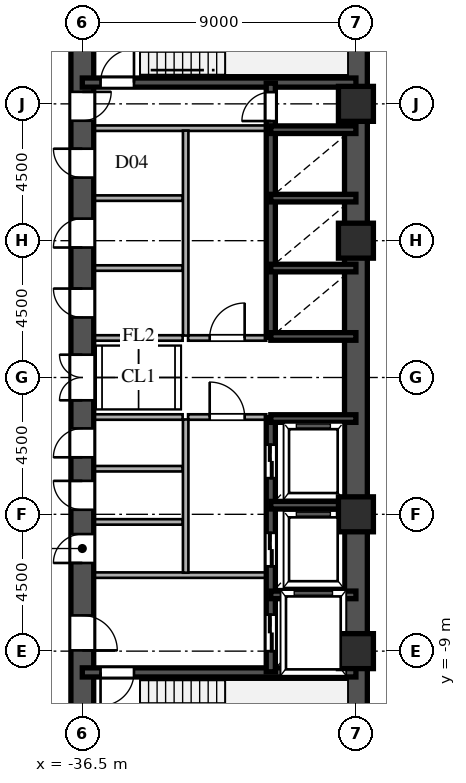
"""IFC4 building model, lengths in metres.
Left out: names, types, materials, properties, quantities, classifications, styles, units other than length and angle.
Written with IfcOpenShell. Run it as: python <this file> out.ifc"""

import sys

from ifc_helpers import new_model, si_unit, direction, frame, frame_2d, origin, origin_2d, place, context, subcontext, project, spatial, rectangle, hollow_rectangle, extrude, source, transform, mapped, element, fill, save


model = new_model("IFC4")
c1 = context("Model", 3, precision=1e-05, world=origin(), true_north=direction((0.0, 1.0)))
c2 = subcontext(c1, "Body", "Model", "MODEL_VIEW")
j1 = project(units=[si_unit("LENGTHUNIT", "METRE"), si_unit("PLANEANGLEUNIT", "RADIAN")], contexts=[c1])
p1 = place(None, origin())
s1 = spatial("IfcSite", under=j1, at=p1, CompositionType="ELEMENT")
p2 = place(p1, origin())
s2 = spatial("IfcBuilding", under=s1, at=p2, CompositionType="ELEMENT")
p3 = place(p2, frame((0.0, 0.0, 54.9)))
s3 = spatial("IfcBuildingStorey", under=s2, at=p3, CompositionType="ELEMENT", Elevation=54.9)
m1 = source(origin(), c2, "Body", "SweptSolid", [
    extrude(hollow_rectangle(XDim=1.15, YDim=1.15, WallThickness=0.048, at=origin_2d()), origin(), (0.0, 0.0, 1.0), 3.6),
])
for number, where, z_axis, x_axis in (
    (1, (-27.5, -9.0, 0.0), (0.0, 0.0, 1.0), (1.0, 0.0, 0.0)),
    (2, (-27.5, -4.5, 0.0), (0.0, 0.0, 1.0), (1.0, 0.0, 0.0)),
    (3, (-27.5, 4.5, 0.0), (0.0, 0.0, 1.0), (1.0, 0.0, 0.0)),
    (4, (-27.5, 9.0, 0.0), (0.0, 0.0, 1.0), (1.0, 0.0, 0.0)),
):
    element("IfcColumn", number, at=place(p3, frame(where, z_axis=z_axis, x_axis=x_axis)), inside=s3, PredefinedType="COLUMN", context=c2, shape_type="MappedRepresentation", body=[
        mapped(m1, transform((0.0, 0.0, 0.0), scale=1.0)),
    ])
for number, where, z_axis, x_axis in (
    (5, (-27.5, -13.5, 0.0), (0.0, 0.0, 1.0), (0.0, 1.0, 0.0)),
    (6, (-27.5, 1.3, 0.0), (0.0, 0.0, 1.0), (0.0, 1.0, 0.0)),
):
    element("IfcWall", number, at=place(p3, frame(where, z_axis=z_axis, x_axis=x_axis)), inside=s3, PredefinedType="SHEAR", context=c2, shape_type="SweptSolid", body=[
        extrude(rectangle(XDim=12.2, YDim=0.75, at=frame_2d((6.1, 0.0))), origin(), (0.0, 0.0, 1.0), 3.38),
    ])
p4 = place(p3, frame((-27.5, -1.3, 0.0), z_axis=(0.0, 0.0, 1.0), x_axis=(0.0, 1.0, 0.0)))
e7 = element("IfcWall", 7, at=p4, inside=s3, PredefinedType="SHEAR", context=c2, shape_type="SweptSolid", body=[
    extrude(rectangle(XDim=2.6, YDim=0.75, at=frame_2d((1.3, 0.0))), origin(), (0.0, 0.0, 1.0), 3.38),
])
p5 = place(p3, frame((-36.5, -13.65, 0.0), z_axis=(0.0, 0.0, 1.0), x_axis=(0.0, 1.0, 0.0)))
e8 = element("IfcWall", 8, at=p5, inside=s3, PredefinedType="SHEAR", context=c2, shape_type="SweptSolid", body=[
    extrude(rectangle(XDim=7.15, YDim=0.75, at=frame_2d((3.575, 0.0))), origin(), (0.0, 0.0, 1.0), 3.38),
])
p6 = place(p5, frame((4.675, 0.0, 0.0)))
e9 = element("IfcOpeningElement", 9, at=p6, cuts=e8, PredefinedType="OPENING", context=c2, shape_type="SweptSolid", body=[
    extrude(rectangle(XDim=1.15, YDim=2.2, at=frame_2d((0.575, 1.1))), frame((0.0, 0.385, 0.0), z_axis=(0.0, -1.0, 0.0), x_axis=(1.0, 0.0, 0.0)), (0.0, 0.0, 1.0), 0.77),
])
p7 = place(p3, frame((-36.5, -1.3, 0.0), z_axis=(0.0, 0.0, 1.0), x_axis=(0.0, 1.0, 0.0)))
e10 = element("IfcWall", 10, at=p7, inside=s3, PredefinedType="SHEAR", context=c2, shape_type="SweptSolid", body=[
    extrude(rectangle(XDim=2.6, YDim=0.75, at=frame_2d((1.3, 0.0))), origin(), (0.0, 0.0, 1.0), 3.38),
])
p8 = place(p7, frame((0.55, 0.0, 0.0)))
e11 = element("IfcOpeningElement", 11, at=p8, cuts=e10, PredefinedType="OPENING", context=c2, shape_type="SweptSolid", body=[
    extrude(rectangle(XDim=1.5, YDim=2.3, at=frame_2d((0.75, 1.15))), frame((0.0, 0.385, 0.0), z_axis=(0.0, -1.0, 0.0), x_axis=(1.0, 0.0, 0.0)), (0.0, 0.0, 1.0), 0.77),
])
p9 = place(p3, frame((-36.5, 8.2, 0.0), z_axis=(0.0, 0.0, 1.0), x_axis=(0.0, 1.0, 0.0)))
e12 = element("IfcWall", 12, at=p9, inside=s3, PredefinedType="SHEAR", context=c2, shape_type="SweptSolid", body=[
    extrude(rectangle(XDim=5.45, YDim=0.75, at=frame_2d((2.725, 0.0))), origin(), (0.0, 0.0, 1.0), 3.38),
])
p10 = place(p9, frame((0.245, 0.0, 0.0)))
e13 = element("IfcOpeningElement", 13, at=p10, cuts=e12, PredefinedType="OPENING", context=c2, shape_type="SweptSolid", body=[
    extrude(rectangle(XDim=0.95, YDim=2.15, at=frame_2d((0.475, 1.075))), frame((0.0, 0.385, 0.0), z_axis=(0.0, -1.0, 0.0), x_axis=(1.0, 0.0, 0.0)), (0.0, 0.0, 1.0), 0.77),
])
p11 = place(p3, frame((-36.5, -6.5, 0.0), z_axis=(0.0, 0.0, 1.0), x_axis=(0.0, 1.0, 0.0)))
e14 = element("IfcWall", 14, at=p11, inside=s3, PredefinedType="SHEAR", context=c2, shape_type="SweptSolid", body=[
    extrude(rectangle(XDim=1.75, YDim=0.75, at=frame_2d((0.875, 0.0))), origin(), (0.0, 0.0, 1.0), 3.38),
])
p12 = place(p11, frame((0.4, 0.0, 0.0)))
e15 = element("IfcOpeningElement", 15, at=p12, cuts=e14, PredefinedType="OPENING", context=c2, shape_type="SweptSolid", body=[
    extrude(rectangle(XDim=0.95, YDim=2.15, at=frame_2d((0.475, 1.075))), frame((0.0, 0.385, 0.0), z_axis=(0.0, -1.0, 0.0), x_axis=(1.0, 0.0, 0.0)), (0.0, 0.0, 1.0), 0.77),
])
p13 = place(p3, frame((-36.5, -4.75, 0.0), z_axis=(0.0, 0.0, 1.0), x_axis=(0.0, 1.0, 0.0)))
e16 = element("IfcWall", 16, at=p13, inside=s3, PredefinedType="SHEAR", context=c2, shape_type="SweptSolid", body=[
    extrude(rectangle(XDim=1.75, YDim=0.75, at=frame_2d((0.875, 0.0))), origin(), (0.0, 0.0, 1.0), 3.38),
])
p14 = place(p13, frame((0.4, 0.0, 0.0)))
e17 = element("IfcOpeningElement", 17, at=p14, cuts=e16, PredefinedType="OPENING", context=c2, shape_type="SweptSolid", body=[
    extrude(rectangle(XDim=0.95, YDim=2.15, at=frame_2d((0.475, 1.075))), frame((0.0, 0.385, 0.0), z_axis=(0.0, -1.0, 0.0), x_axis=(1.0, 0.0, 0.0)), (0.0, 0.0, 1.0), 0.77),
])
p15 = place(p3, frame((-36.5, -3.0, 0.0), z_axis=(0.0, 0.0, 1.0), x_axis=(0.0, 1.0, 0.0)))
e18 = element("IfcWall", 18, at=p15, inside=s3, PredefinedType="SHEAR", context=c2, shape_type="SweptSolid", body=[
    extrude(rectangle(XDim=1.7, YDim=0.75, at=frame_2d((0.85, 0.0))), origin(), (0.0, 0.0, 1.0), 3.38),
])
p16 = place(p15, frame((0.375, 0.0, 0.0)))
e19 = element("IfcOpeningElement", 19, at=p16, cuts=e18, PredefinedType="OPENING", context=c2, shape_type="SweptSolid", body=[
    extrude(rectangle(XDim=0.95, YDim=2.15, at=frame_2d((0.475, 1.075))), frame((0.0, 0.385, 0.0), z_axis=(0.0, -1.0, 0.0), x_axis=(1.0, 0.0, 0.0)), (0.0, 0.0, 1.0), 0.77),
])
p17 = place(p3, frame((-36.5, 1.3, 0.0), z_axis=(0.0, 0.0, 1.0), x_axis=(0.0, 1.0, 0.0)))
e20 = element("IfcWall", 20, at=p17, inside=s3, PredefinedType="SHEAR", context=c2, shape_type="SweptSolid", body=[
    extrude(rectangle(XDim=2.3, YDim=0.75, at=frame_2d((1.15, 0.0))), origin(), (0.0, 0.0, 1.0), 3.38),
])
p18 = place(p17, frame((0.675, 0.0, 0.0)))
e21 = element("IfcOpeningElement", 21, at=p18, cuts=e20, PredefinedType="OPENING", context=c2, shape_type="SweptSolid", body=[
    extrude(rectangle(XDim=0.95, YDim=2.15, at=frame_2d((0.475, 1.075))), frame((0.0, 0.385, 0.0), z_axis=(0.0, -1.0, 0.0), x_axis=(1.0, 0.0, 0.0)), (0.0, 0.0, 1.0), 0.77),
])
p19 = place(p3, frame((-36.5, 3.6, 0.0), z_axis=(0.0, 0.0, 1.0), x_axis=(0.0, 1.0, 0.0)))
e22 = element("IfcWall", 22, at=p19, inside=s3, PredefinedType="SHEAR", context=c2, shape_type="SweptSolid", body=[
    extrude(rectangle(XDim=2.3, YDim=0.75, at=frame_2d((1.15, 0.0))), origin(), (0.0, 0.0, 1.0), 3.38),
])
p20 = place(p19, frame((0.675, 0.0, 0.0)))
e23 = element("IfcOpeningElement", 23, at=p20, cuts=e22, PredefinedType="OPENING", context=c2, shape_type="SweptSolid", body=[
    extrude(rectangle(XDim=0.95, YDim=2.15, at=frame_2d((0.475, 1.075))), frame((0.0, 0.385, 0.0), z_axis=(0.0, -1.0, 0.0), x_axis=(1.0, 0.0, 0.0)), (0.0, 0.0, 1.0), 0.77),
])
p21 = place(p3, frame((-36.5, 5.9, 0.0), z_axis=(0.0, 0.0, 1.0), x_axis=(0.0, 1.0, 0.0)))
e24 = element("IfcWall", 24, at=p21, inside=s3, PredefinedType="SHEAR", context=c2, shape_type="SweptSolid", body=[
    extrude(rectangle(XDim=2.3, YDim=0.75, at=frame_2d((1.15, 0.0))), origin(), (0.0, 0.0, 1.0), 3.38),
])
p22 = place(p21, frame((0.675, 0.0, 0.0)))
e25 = element("IfcOpeningElement", 25, at=p22, cuts=e24, PredefinedType="OPENING", context=c2, shape_type="SweptSolid", body=[
    extrude(rectangle(XDim=0.95, YDim=2.15, at=frame_2d((0.475, 1.075))), frame((0.0, 0.385, 0.0), z_axis=(0.0, -1.0, 0.0), x_axis=(1.0, 0.0, 0.0)), (0.0, 0.0, 1.0), 0.77),
])
p23 = place(p3, frame((-36.5, -9.7, 0.0), z_axis=(0.0, 0.0, 1.0), x_axis=(1.0, 0.0, 0.0)))
e26 = element("IfcWall", 26, at=p23, inside=s3, PredefinedType="SHEAR", context=c2, shape_type="SweptSolid", body=[
    extrude(rectangle(XDim=9.0, YDim=0.3, at=frame_2d((4.5, 0.0))), origin(), (0.0, 0.0, 1.0), 3.38),
])
p24 = place(p23, frame((0.6, 0.0, 0.0)))
e27 = element("IfcOpeningElement", 27, at=p24, cuts=e26, PredefinedType="OPENING", context=c2, shape_type="SweptSolid", body=[
    extrude(rectangle(XDim=1.1, YDim=2.2, at=frame_2d((0.55, 1.1))), frame((0.0, 0.16, 0.0), z_axis=(0.0, -1.0, 0.0), x_axis=(1.0, 0.0, 0.0)), (0.0, 0.0, 1.0), 0.32),
])
p25 = place(p3, frame((-36.5, 9.7, 0.0), z_axis=(0.0, 0.0, 1.0), x_axis=(1.0, 0.0, 0.0)))
e28 = element("IfcWall", 28, at=p25, inside=s3, PredefinedType="SHEAR", context=c2, shape_type="SweptSolid", body=[
    extrude(rectangle(XDim=9.0, YDim=0.3, at=frame_2d((4.5, 0.0))), origin(), (0.0, 0.0, 1.0), 3.38),
])
p26 = place(p25, frame((0.6, 0.0, 0.0)))
e29 = element("IfcOpeningElement", 29, at=p26, cuts=e28, PredefinedType="OPENING", context=c2, shape_type="SweptSolid", body=[
    extrude(rectangle(XDim=1.1, YDim=2.2, at=frame_2d((0.55, 1.1))), frame((0.0, 0.16, 0.0), z_axis=(0.0, -1.0, 0.0), x_axis=(1.0, 0.0, 0.0)), (0.0, 0.0, 1.0), 0.32),
])
for number, where, z_axis, x_axis in (
    (30, (-30.3, -7.15, 0.0), (0.0, 0.0, 1.0), (1.0, 0.0, 0.0)),
    (31, (-30.3, -4.2, 0.0), (0.0, 0.0, 1.0), (1.0, 0.0, 0.0)),
    (32, (-30.3, -1.35, 0.0), (0.0, 0.0, 1.0), (1.0, 0.0, 0.0)),
    (33, (-30.3, 1.35, 0.0), (0.0, 0.0, 1.0), (1.0, 0.0, 0.0)),
    (34, (-30.3, 3.6, 0.0), (0.0, 0.0, 1.0), (1.0, 0.0, 0.0)),
    (35, (-30.3, 5.9, 0.0), (0.0, 0.0, 1.0), (1.0, 0.0, 0.0)),
    (36, (-30.3, 8.15, 0.0), (0.0, 0.0, 1.0), (1.0, 0.0, 0.0)),
):
    element("IfcWall", number, at=place(p3, frame(where, z_axis=z_axis, x_axis=x_axis)), inside=s3, PredefinedType="SHEAR", context=c2, shape_type="SweptSolid", body=[
        extrude(rectangle(XDim=2.8, YDim=0.25, at=frame_2d((1.4, 0.0))), origin(), (0.0, 0.0, 1.0), 3.38),
    ])
p27 = place(p3, frame((-30.3, -9.68, 0.0), z_axis=(0.0, 0.0, 1.0), x_axis=(0.0, 1.0, 0.0)))
e37 = element("IfcWall", 37, at=p27, inside=s3, PredefinedType="SHEAR", context=c2, shape_type="SweptSolid", body=[
    extrude(rectangle(XDim=2.56, YDim=0.3, at=frame_2d((1.28, 0.0))), origin(), (0.0, 0.0, 1.0), 3.38),
])
p28 = place(p27, frame((0.68, 0.0, 0.0)))
e38 = element("IfcOpeningElement", 38, at=p28, cuts=e37, PredefinedType="OPENING", context=c2, shape_type="SweptSolid", body=[
    extrude(rectangle(XDim=1.2, YDim=2.25, at=frame_2d((0.6, 1.125))), frame((0.0, 0.16, 0.0), z_axis=(0.0, -1.0, 0.0), x_axis=(1.0, 0.0, 0.0)), (0.0, 0.0, 1.0), 0.32),
])
p29 = place(p3, frame((-30.3, -7.12, 0.0), z_axis=(0.0, 0.0, 1.0), x_axis=(0.0, 1.0, 0.0)))
e39 = element("IfcWall", 39, at=p29, inside=s3, PredefinedType="SHEAR", context=c2, shape_type="SweptSolid", body=[
    extrude(rectangle(XDim=2.92, YDim=0.3, at=frame_2d((1.46, 0.0))), origin(), (0.0, 0.0, 1.0), 3.38),
])
p30 = place(p29, frame((0.91, 0.0, 0.0)))
e40 = element("IfcOpeningElement", 40, at=p30, cuts=e39, PredefinedType="OPENING", context=c2, shape_type="SweptSolid", body=[
    extrude(rectangle(XDim=1.1, YDim=2.2, at=frame_2d((0.55, 1.1))), frame((0.0, 0.16, 0.0), z_axis=(0.0, -1.0, 0.0), x_axis=(1.0, 0.0, 0.0)), (0.0, 0.0, 1.0), 0.32),
])
p31 = place(p3, frame((-30.3, -4.2, 0.0), z_axis=(0.0, 0.0, 1.0), x_axis=(0.0, 1.0, 0.0)))
e41 = element("IfcWall", 41, at=p31, inside=s3, PredefinedType="SHEAR", context=c2, shape_type="SweptSolid", body=[
    extrude(rectangle(XDim=2.88, YDim=0.3, at=frame_2d((1.44, 0.0))), origin(), (0.0, 0.0, 1.0), 3.38),
])
p32 = place(p31, frame((0.89, 0.0, 0.0)))
e42 = element("IfcOpeningElement", 42, at=p32, cuts=e41, PredefinedType="OPENING", context=c2, shape_type="SweptSolid", body=[
    extrude(rectangle(XDim=1.1, YDim=2.2, at=frame_2d((0.55, 1.1))), frame((0.0, 0.16, 0.0), z_axis=(0.0, -1.0, 0.0), x_axis=(1.0, 0.0, 0.0)), (0.0, 0.0, 1.0), 0.32),
])
p33 = place(p3, frame((-30.3, 1.32, 0.0), z_axis=(0.0, 0.0, 1.0), x_axis=(0.0, 1.0, 0.0)))
e43 = element("IfcWall", 43, at=p33, inside=s3, PredefinedType="SHEAR", context=c2, shape_type="SweptSolid", body=[
    extrude(rectangle(XDim=2.28, YDim=0.3, at=frame_2d((1.14, 0.0))), origin(), (0.0, 0.0, 1.0), 3.38),
])
p34 = place(p3, frame((-30.3, 3.6, 0.0), z_axis=(0.0, 0.0, 1.0), x_axis=(0.0, 1.0, 0.0)))
e44 = element("IfcWall", 44, at=p34, inside=s3, PredefinedType="SHEAR", context=c2, shape_type="SweptSolid", body=[
    extrude(rectangle(XDim=2.3, YDim=0.3, at=frame_2d((1.15, 0.0))), origin(), (0.0, 0.0, 1.0), 3.38),
])
p35 = place(p3, frame((-30.3, 5.9, 0.0), z_axis=(0.0, 0.0, 1.0), x_axis=(0.0, 1.0, 0.0)))
e45 = element("IfcWall", 45, at=p35, inside=s3, PredefinedType="SHEAR", context=c2, shape_type="SweptSolid", body=[
    extrude(rectangle(XDim=2.25, YDim=0.3, at=frame_2d((1.125, 0.0))), origin(), (0.0, 0.0, 1.0), 3.38),
])
p36 = place(p3, frame((-30.3, 8.15, 0.0), z_axis=(0.0, 0.0, 1.0), x_axis=(0.0, 1.0, 0.0)))
e46 = element("IfcWall", 46, at=p36, inside=s3, PredefinedType="SHEAR", context=c2, shape_type="SweptSolid", body=[
    extrude(rectangle(XDim=1.53, YDim=0.3, at=frame_2d((0.765, 0.0))), origin(), (0.0, 0.0, 1.0), 3.38),
])
p37 = place(p36, frame((0.285, 0.0, 0.0)))
e47 = element("IfcOpeningElement", 47, at=p37, cuts=e46, PredefinedType="OPENING", context=c2, shape_type="SweptSolid", body=[
    extrude(rectangle(XDim=0.95, YDim=2.15, at=frame_2d((0.475, 1.075))), frame((0.0, 0.16, 0.0), z_axis=(0.0, -1.0, 0.0), x_axis=(1.0, 0.0, 0.0)), (0.0, 0.0, 1.0), 0.32),
])
for number, where, z_axis, x_axis in (
    (48, (-36.15, -6.5, 0.0), (0.0, 0.0, 1.0), (1.0, 0.0, 0.0)),
    (49, (-36.15, 8.2, 0.0), (0.0, 0.0, 1.0), (1.0, 0.0, 0.0)),
):
    element("IfcWall", number, at=place(p3, frame(where, z_axis=z_axis, x_axis=x_axis)), inside=s3, PredefinedType="PARTITIONING", context=c2, shape_type="SweptSolid", body=[
        extrude(rectangle(XDim=5.7, YDim=0.18, at=frame_2d((2.85, 0.0))), origin(), (0.0, 0.0, 1.0), 3.38),
    ])
p38 = place(p3, frame((-33.1, -6.42, 0.0), z_axis=(0.0, 0.0, 1.0), x_axis=(0.0, 1.0, 0.0)))
e50 = element("IfcWall", 50, at=p38, inside=s3, PredefinedType="PARTITIONING", context=c2, shape_type="SweptSolid", body=[
    extrude(rectangle(XDim=5.04, YDim=0.18, at=frame_2d((2.52, 0.0))), origin(), (0.0, 0.0, 1.0), 3.38),
])
p39 = place(p3, frame((-33.1, 1.38, 0.0), z_axis=(0.0, 0.0, 1.0), x_axis=(0.0, 1.0, 0.0)))
e51 = element("IfcWall", 51, at=p39, inside=s3, PredefinedType="PARTITIONING", context=c2, shape_type="SweptSolid", body=[
    extrude(rectangle(XDim=6.74, YDim=0.18, at=frame_2d((3.37, 0.0))), origin(), (0.0, 0.0, 1.0), 3.38),
])
p40 = place(p3, frame((-33.02, -1.3, 0.0), z_axis=(0.0, 0.0, 1.0), x_axis=(1.0, 0.0, 0.0)))
e52 = element("IfcWall", 52, at=p40, inside=s3, PredefinedType="PARTITIONING", context=c2, shape_type="SweptSolid", body=[
    extrude(rectangle(XDim=2.57, YDim=0.18, at=frame_2d((1.285, 0.0))), origin(), (0.0, 0.0, 1.0), 3.38),
])
p41 = place(p40, frame((0.71, 0.0, 0.0)))
e53 = element("IfcOpeningElement", 53, at=p41, cuts=e52, PredefinedType="OPENING", context=c2, shape_type="SweptSolid", body=[
    extrude(rectangle(XDim=1.15, YDim=2.2, at=frame_2d((0.575, 1.1))), frame((0.0, 0.1, 0.0), z_axis=(0.0, -1.0, 0.0), x_axis=(1.0, 0.0, 0.0)), (0.0, 0.0, 1.0), 0.2),
])
p42 = place(p3, frame((-33.02, 1.3, 0.0), z_axis=(0.0, 0.0, 1.0), x_axis=(1.0, 0.0, 0.0)))
e54 = element("IfcWall", 54, at=p42, inside=s3, PredefinedType="PARTITIONING", context=c2, shape_type="SweptSolid", body=[
    extrude(rectangle(XDim=2.57, YDim=0.18, at=frame_2d((1.285, 0.0))), origin(), (0.0, 0.0, 1.0), 3.38),
])
p43 = place(p42, frame((0.71, 0.0, 0.0)))
e55 = element("IfcOpeningElement", 55, at=p43, cuts=e54, PredefinedType="OPENING", context=c2, shape_type="SweptSolid", body=[
    extrude(rectangle(XDim=1.15, YDim=2.2, at=frame_2d((0.575, 1.1))), frame((0.0, 0.1, 0.0), z_axis=(0.0, -1.0, 0.0), x_axis=(1.0, 0.0, 0.0)), (0.0, 0.0, 1.0), 0.2),
])
for number, where, z_axis, x_axis in (
    (56, (-36.15, -1.3, 0.0), (0.0, 0.0, 1.0), (1.0, 0.0, 0.0)),
    (57, (-36.15, 1.3, 0.0), (0.0, 0.0, 1.0), (1.0, 0.0, 0.0)),
    (58, (-36.15, -4.75, 0.0), (0.0, 0.0, 1.0), (1.0, 0.0, 0.0)),
    (59, (-36.15, -3.0, 0.0), (0.0, 0.0, 1.0), (1.0, 0.0, 0.0)),
    (60, (-36.15, 3.6, 0.0), (0.0, 0.0, 1.0), (1.0, 0.0, 0.0)),
    (61, (-36.15, 5.9, 0.0), (0.0, 0.0, 1.0), (1.0, 0.0, 0.0)),
):
    element("IfcWall", number, at=place(p3, frame(where, z_axis=z_axis, x_axis=x_axis)), inside=s3, PredefinedType="PARTITIONING", context=c2, shape_type="SweptSolid", body=[
        extrude(rectangle(XDim=2.95, YDim=0.18, at=frame_2d((1.475, 0.0))), origin(), (0.0, 0.0, 1.0), 3.38),
    ])
m2 = source(origin(), c2, "Body", "SweptSolid", [
    extrude(rectangle(XDim=1.15, YDim=2.2, at=frame_2d((0.575, 1.1))), frame((0.0, 0.025, 0.0), z_axis=(0.0, -1.0, 0.0), x_axis=(1.0, 0.0, 0.0)), (0.0, 0.0, 1.0), 0.05),
])
p44 = place(p6, frame((1.15, 0.0, 0.0), z_axis=(0.0, 0.0, 1.0), x_axis=(-1.0, 0.0, 0.0)))
e62 = element("IfcDoor", 62, at=p44, inside=s3, OperationType="SINGLE_SWING_LEFT", PredefinedType="DOOR", context=c2, shape_type="MappedRepresentation", body=[
    mapped(m2, transform((0.0, 0.0, 0.0), scale=1.0)),
])
fill(e9, e62)
m3 = source(origin(), c2, "Body", "SweptSolid", [
    extrude(rectangle(XDim=1.5, YDim=2.3, at=frame_2d((0.75, 1.15))), frame((0.0, 0.025, 0.0), z_axis=(0.0, -1.0, 0.0), x_axis=(1.0, 0.0, 0.0)), (0.0, 0.0, 1.0), 0.05),
])
p45 = place(p8, origin())
e63 = element("IfcDoor", 63, at=p45, inside=s3, OperationType="DOUBLE_SWING_LEFT", PredefinedType="DOOR", context=c2, shape_type="MappedRepresentation", body=[
    mapped(m3, transform((0.0, 0.0, 0.0), scale=1.0)),
])
fill(e11, e63)
m4 = source(origin(), c2, "Body", "SweptSolid", [
    extrude(rectangle(XDim=0.95, YDim=2.15, at=frame_2d((0.475, 1.075))), frame((0.0, 0.025, 0.0), z_axis=(0.0, -1.0, 0.0), x_axis=(1.0, 0.0, 0.0)), (0.0, 0.0, 1.0), 0.05),
])
p46 = place(p10, frame((0.95, 0.0, 0.0), z_axis=(0.0, 0.0, 1.0), x_axis=(-1.0, 0.0, 0.0)))
e64 = element("IfcDoor", 64, at=p46, inside=s3, OperationType="SINGLE_SWING_RIGHT", PredefinedType="DOOR", context=c2, shape_type="MappedRepresentation", body=[
    mapped(m4, transform((0.0, 0.0, 0.0), scale=1.0)),
])
fill(e13, e64)
p47 = place(p12, origin())
e65 = element("IfcDoor", 65, at=p47, inside=s3, OperationType="SINGLE_SWING_LEFT", PredefinedType="DOOR", context=c2, shape_type="MappedRepresentation", body=[
    mapped(m4, transform((0.0, 0.0, 0.0), scale=1.0)),
])
fill(e15, e65)
p48 = place(p14, origin())
e66 = element("IfcDoor", 66, at=p48, inside=s3, OperationType="SINGLE_SWING_RIGHT", PredefinedType="DOOR", context=c2, shape_type="MappedRepresentation", body=[
    mapped(m4, transform((0.0, 0.0, 0.0), scale=1.0)),
])
fill(e17, e66)
p49 = place(p16, origin())
e67 = element("IfcDoor", 67, at=p49, inside=s3, OperationType="SINGLE_SWING_LEFT", PredefinedType="DOOR", context=c2, shape_type="MappedRepresentation", body=[
    mapped(m4, transform((0.0, 0.0, 0.0), scale=1.0)),
])
fill(e19, e67)
p50 = place(p18, origin())
e68 = element("IfcDoor", 68, at=p50, inside=s3, OperationType="SINGLE_SWING_RIGHT", PredefinedType="DOOR", context=c2, shape_type="MappedRepresentation", body=[
    mapped(m4, transform((0.0, 0.0, 0.0), scale=1.0)),
])
fill(e21, e68)
p51 = place(p20, origin())
e69 = element("IfcDoor", 69, at=p51, inside=s3, OperationType="SINGLE_SWING_LEFT", PredefinedType="DOOR", context=c2, shape_type="MappedRepresentation", body=[
    mapped(m4, transform((0.0, 0.0, 0.0), scale=1.0)),
])
fill(e23, e69)
p52 = place(p22, origin())
e70 = element("IfcDoor", 70, at=p52, inside=s3, OperationType="SINGLE_SWING_RIGHT", PredefinedType="DOOR", context=c2, shape_type="MappedRepresentation", body=[
    mapped(m4, transform((0.0, 0.0, 0.0), scale=1.0)),
])
fill(e25, e70)
m5 = source(origin(), c2, "Body", "SweptSolid", [
    extrude(rectangle(XDim=1.1, YDim=2.2, at=frame_2d((0.55, 1.1))), frame((0.0, 0.025, 0.0), z_axis=(0.0, -1.0, 0.0), x_axis=(1.0, 0.0, 0.0)), (0.0, 0.0, 1.0), 0.05),
])
p53 = place(p24, frame((1.1, 0.0, 0.0), z_axis=(0.0, 0.0, 1.0), x_axis=(-1.0, 0.0, 0.0)))
e71 = element("IfcDoor", 71, at=p53, inside=s3, OperationType="SINGLE_SWING_LEFT", PredefinedType="DOOR", context=c2, shape_type="MappedRepresentation", body=[
    mapped(m5, transform((0.0, 0.0, 0.0), scale=1.0)),
])
fill(e27, e71)
p54 = place(p26, origin())
e72 = element("IfcDoor", 72, at=p54, inside=s3, OperationType="SINGLE_SWING_RIGHT", PredefinedType="DOOR", context=c2, shape_type="MappedRepresentation", body=[
    mapped(m5, transform((0.0, 0.0, 0.0), scale=1.0)),
])
fill(e29, e72)
m6 = source(origin(), c2, "Body", "SweptSolid", [
    extrude(rectangle(XDim=1.2, YDim=2.25, at=frame_2d((0.6, 1.125))), frame((0.0, 0.025, 0.0), z_axis=(0.0, -1.0, 0.0), x_axis=(1.0, 0.0, 0.0)), (0.0, 0.0, 1.0), 0.05),
])
p55 = place(p28, origin())
e73 = element("IfcDoor", 73, at=p55, inside=s3, OperationType="DOUBLE_DOOR_SLIDING", PredefinedType="DOOR", context=c2, shape_type="MappedRepresentation", body=[
    mapped(m6, transform((0.0, 0.0, 0.0), scale=1.0)),
])
fill(e38, e73)
m7 = source(origin(), c2, "Body", "SweptSolid", [
    extrude(rectangle(XDim=1.1, YDim=2.2, at=frame_2d((0.55, 1.1))), frame((0.0, 0.025, 0.0), z_axis=(0.0, -1.0, 0.0), x_axis=(1.0, 0.0, 0.0)), (0.0, 0.0, 1.0), 0.05),
])
p56 = place(p30, origin())
e74 = element("IfcDoor", 74, at=p56, inside=s3, OperationType="DOUBLE_DOOR_SLIDING", PredefinedType="DOOR", context=c2, shape_type="MappedRepresentation", body=[
    mapped(m7, transform((0.0, 0.0, 0.0), scale=1.0)),
])
fill(e40, e74)
p57 = place(p32, origin())
e75 = element("IfcDoor", 75, at=p57, inside=s3, OperationType="DOUBLE_DOOR_SLIDING", PredefinedType="DOOR", context=c2, shape_type="MappedRepresentation", body=[
    mapped(m7, transform((0.0, 0.0, 0.0), scale=1.0)),
])
fill(e42, e75)
p58 = place(p37, origin())
e76 = element("IfcDoor", 76, at=p58, inside=s3, OperationType="SINGLE_SWING_LEFT", PredefinedType="DOOR", context=c2, shape_type="MappedRepresentation", body=[
    mapped(m4, transform((0.0, 0.0, 0.0), scale=1.0)),
])
fill(e47, e76)
p59 = place(p41, origin())
e77 = element("IfcDoor", 77, at=p59, inside=s3, OperationType="SINGLE_SWING_LEFT", PredefinedType="DOOR", context=c2, shape_type="MappedRepresentation", body=[
    mapped(m2, transform((0.0, 0.0, 0.0), scale=1.0)),
])
fill(e53, e77)
p60 = place(p43, origin())
e78 = element("IfcDoor", 78, at=p60, inside=s3, OperationType="SINGLE_SWING_RIGHT", PredefinedType="DOOR", context=c2, shape_type="MappedRepresentation", body=[
    mapped(m2, transform((0.0, 0.0, 0.0), scale=1.0)),
])
fill(e55, e78)
save(model, sys.argv[1])
